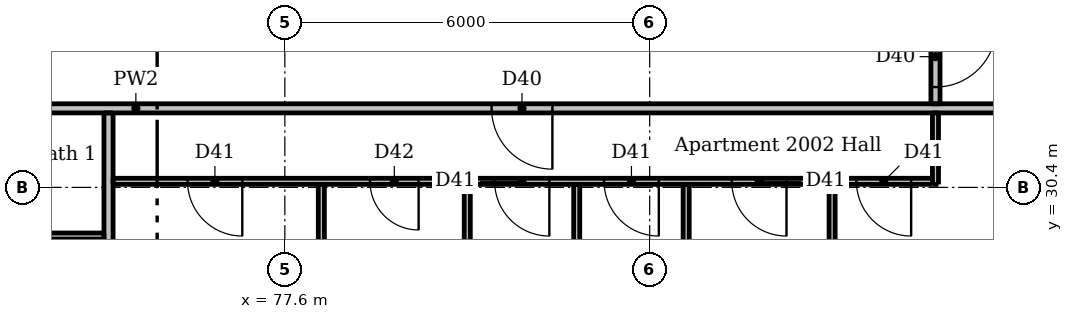
"""IFC4 building model, lengths in metres.
Left out: names, types, materials, properties, quantities, classifications, styles, units other than length and angle.
Written with IfcOpenShell. Run it as: python <this file> out.ifc"""

import sys

from ifc_helpers import new_model, si_unit, direction, frame, frame_2d, origin, place, context, subcontext, project, spatial, rectangle, extrude, element, fill, save


model = new_model("IFC4")
c1 = context("Model", 3, precision=1e-05, world=origin(), true_north=direction((0.0, 1.0)))
c2 = subcontext(c1, "Body", "Model", "MODEL_VIEW")
j1 = project(units=[si_unit("LENGTHUNIT", "METRE"), si_unit("PLANEANGLEUNIT", "RADIAN")], contexts=[c1])
p1 = place(None, origin())
s1 = spatial("IfcSite", under=j1, at=p1, CompositionType="ELEMENT")
p2 = place(p1, origin())
s2 = spatial("IfcBuilding", under=s1, at=p2, CompositionType="ELEMENT")
p3 = place(p2, frame((0.0, 0.0, 78.7)))
s3 = spatial("IfcBuildingStorey", under=s2, at=p3, CompositionType="ELEMENT", Elevation=78.7)
p4 = place(p3, frame((78.2, 28.35, 0.0), z_axis=(0.0, 0.0, 1.0), x_axis=(0.0, 1.0, 0.0)))
e1 = element("IfcWall", 1, at=p4, inside=s3, PredefinedType="PARTITIONING", context=c2, shape_type="SweptSolid", body=[
    extrude(rectangle(XDim=2.1, YDim=0.1, at=frame_2d((1.05, 0.0))), origin(), (0.0, 0.0, 1.0), 3.05),
])
p5 = place(p3, frame((80.6, 21.5, 0.0), z_axis=(0.0, 0.0, 1.0), x_axis=(0.0, 1.0, 0.0)))
e2 = element("IfcWall", 2, at=p5, inside=s3, PredefinedType="PARTITIONING", context=c2, shape_type="SweptSolid", body=[
    extrude(rectangle(XDim=8.95, YDim=0.1, at=frame_2d((4.475, 0.0))), origin(), (0.0, 0.0, 1.0), 3.05),
])
p6 = place(p3, frame((82.4, 28.35, 0.0), z_axis=(0.0, 0.0, 1.0), x_axis=(0.0, 1.0, 0.0)))
e3 = element("IfcWall", 3, at=p6, inside=s3, PredefinedType="PARTITIONING", context=c2, shape_type="SweptSolid", body=[
    extrude(rectangle(XDim=2.1, YDim=0.1, at=frame_2d((1.05, 0.0))), origin(), (0.0, 0.0, 1.0), 3.05),
])
p7 = place(p3, frame((84.2, 28.45, 0.0), z_axis=(0.0, 0.0, 1.0), x_axis=(0.0, 1.0, 0.0)))
e4 = element("IfcWall", 4, at=p7, inside=s3, PredefinedType="PARTITIONING", context=c2, shape_type="SweptSolid", body=[
    extrude(rectangle(XDim=2.0, YDim=0.1, at=frame_2d((1.0, 0.0))), origin(), (0.0, 0.0, 1.0), 3.05),
])
p8 = place(p3, frame((86.6, 24.5, 0.0), z_axis=(0.0, 0.0, 1.0), x_axis=(0.0, 1.0, 0.0)))
e5 = element("IfcWall", 5, at=p8, inside=s3, PredefinedType="PARTITIONING", context=c2, shape_type="SweptSolid", body=[
    extrude(rectangle(XDim=5.95, YDim=0.1, at=frame_2d((2.975, 0.0))), origin(), (0.0, 0.0, 1.0), 3.05),
])
p9 = place(p3, frame((88.3, 30.45, 0.0), z_axis=(0.0, 0.0, 1.0), x_axis=(0.0, 1.0, 0.0)))
e6 = element("IfcWall", 6, at=p9, inside=s3, PredefinedType="PARTITIONING", context=c2, shape_type="SweptSolid", body=[
    extrude(rectangle(XDim=1.175, YDim=0.1, at=frame_2d((0.587, 0.0))), origin(), (0.0, 0.0, 1.0), 3.05),
])
p10 = place(p3, frame((88.25, 30.5, 0.0), z_axis=(0.0, 0.0, 1.0), x_axis=(-1.0, 0.0, 0.0)))
e7 = element("IfcWall", 7, at=p10, inside=s3, PredefinedType="PARTITIONING", context=c2, shape_type="SweptSolid", body=[
    extrude(rectangle(XDim=13.475, YDim=0.1, at=frame_2d((6.738, 0.0))), origin(), (0.0, 0.0, 1.0), 3.05),
])
p11 = place(p10, frame((6.3, 0.0, 0.0)))
e8 = element("IfcOpeningElement", 8, at=p11, cuts=e7, PredefinedType="OPENING", context=c2, shape_type="SweptSolid", body=[
    extrude(rectangle(XDim=0.9, YDim=2.1, at=frame_2d((0.45, 1.05))), frame((0.0, 0.06, 0.0), z_axis=(0.0, -1.0, 0.0), x_axis=(1.0, 0.0, 0.0)), (0.0, 0.0, 1.0), 0.12),
])
p12 = place(p10, frame((2.4, 0.0, 0.0)))
e9 = element("IfcOpeningElement", 9, at=p12, cuts=e7, PredefinedType="OPENING", context=c2, shape_type="SweptSolid", body=[
    extrude(rectangle(XDim=0.9, YDim=2.1, at=frame_2d((0.45, 1.05))), frame((0.0, 0.06, 0.0), z_axis=(0.0, -1.0, 0.0), x_axis=(1.0, 0.0, 0.0)), (0.0, 0.0, 1.0), 0.12),
])
p13 = place(p10, frame((4.5, 0.0, 0.0)))
e10 = element("IfcOpeningElement", 10, at=p13, cuts=e7, PredefinedType="OPENING", context=c2, shape_type="SweptSolid", body=[
    extrude(rectangle(XDim=0.9, YDim=2.1, at=frame_2d((0.45, 1.05))), frame((0.0, 0.06, 0.0), z_axis=(0.0, -1.0, 0.0), x_axis=(1.0, 0.0, 0.0)), (0.0, 0.0, 1.0), 0.12),
])
p14 = place(p10, frame((11.35, 0.0, 0.0)))
e11 = element("IfcOpeningElement", 11, at=p14, cuts=e7, PredefinedType="OPENING", context=c2, shape_type="SweptSolid", body=[
    extrude(rectangle(XDim=0.9, YDim=2.1, at=frame_2d((0.45, 1.05))), frame((0.0, 0.06, 0.0), z_axis=(0.0, -1.0, 0.0), x_axis=(1.0, 0.0, 0.0)), (0.0, 0.0, 1.0), 0.12),
])
p15 = place(p10, frame((0.35, 0.0, 0.0)))
e12 = element("IfcOpeningElement", 12, at=p15, cuts=e7, PredefinedType="OPENING", context=c2, shape_type="SweptSolid", body=[
    extrude(rectangle(XDim=0.9, YDim=2.1, at=frame_2d((0.45, 1.05))), frame((0.0, 0.06, 0.0), z_axis=(0.0, -1.0, 0.0), x_axis=(1.0, 0.0, 0.0)), (0.0, 0.0, 1.0), 0.12),
])
p16 = place(p10, frame((8.45, 0.0, 0.0)))
e13 = element("IfcOpeningElement", 13, at=p16, cuts=e7, PredefinedType="OPENING", context=c2, shape_type="SweptSolid", body=[
    extrude(rectangle(XDim=0.8, YDim=2.1, at=frame_2d((0.4, 1.05))), frame((0.0, 0.06, 0.0), z_axis=(0.0, -1.0, 0.0), x_axis=(1.0, 0.0, 0.0)), (0.0, 0.0, 1.0), 0.12),
])
p17 = place(p3, frame((68.15, 29.6, 0.0), z_axis=(0.0, 0.0, 1.0), x_axis=(1.0, 0.0, 0.0)))
e14 = element("IfcWall", 14, at=p17, inside=s3, PredefinedType="PARTITIONING", context=c2, shape_type="SweptSolid", body=[
    extrude(rectangle(XDim=6.475, YDim=0.1, at=frame_2d((3.238, 0.0))), origin(), (0.0, 0.0, 1.0), 3.05),
])
p18 = place(p17, frame((4.05, 0.0, 0.0)))
e15 = element("IfcOpeningElement", 15, at=p18, cuts=e14, PredefinedType="OPENING", context=c2, shape_type="SweptSolid", body=[
    extrude(rectangle(XDim=0.8, YDim=2.1, at=frame_2d((0.4, 1.05))), frame((0.0, 0.06, 0.0), z_axis=(0.0, -1.0, 0.0), x_axis=(1.0, 0.0, 0.0)), (0.0, 0.0, 1.0), 0.12),
])
p19 = place(p3, frame((74.7, 21.5, 0.0), z_axis=(0.0, 0.0, 1.0), x_axis=(0.0, 1.0, 0.0)))
e16 = element("IfcWall", 16, at=p19, inside=s3, PredefinedType="PARTITIONING", context=c2, shape_type="SweptSolid", body=[
    extrude(rectangle(XDim=10.125, YDim=0.15, at=frame_2d((5.062, 0.0))), origin(), (0.0, 0.0, 1.0), 3.05),
])
p20 = place(p3, frame((88.3, 60.475, 0.0), z_axis=(0.0, 0.0, 1.0), x_axis=(0.0, -1.0, 0.0)))
e17 = element("IfcWall", 17, at=p20, inside=s3, PredefinedType="PARTITIONING", context=c2, shape_type="SweptSolid", body=[
    extrude(rectangle(XDim=28.7, YDim=0.15, at=frame_2d((14.35, 0.0))), origin(), (0.0, 0.0, 1.0), 3.05),
])
p21 = place(p20, frame((27.425, 0.0, 0.0)))
e18 = element("IfcOpeningElement", 18, at=p21, cuts=e17, PredefinedType="OPENING", context=c2, shape_type="SweptSolid", body=[
    extrude(rectangle(XDim=1.0, YDim=2.1, at=frame_2d((0.5, 1.05))), frame((0.0, 0.085, 0.0), z_axis=(0.0, -1.0, 0.0), x_axis=(1.0, 0.0, 0.0)), (0.0, 0.0, 1.0), 0.17),
])
p22 = place(p20, frame((10.575, 0.0, 0.0)))
e19 = element("IfcOpeningElement", 19, at=p22, cuts=e17, PredefinedType="OPENING", context=c2, shape_type="SweptSolid", body=[
    extrude(rectangle(XDim=1.0, YDim=2.1, at=frame_2d((0.5, 1.05))), frame((0.0, 0.085, 0.0), z_axis=(0.0, -1.0, 0.0), x_axis=(1.0, 0.0, 0.0)), (0.0, 0.0, 1.0), 0.17),
])
p23 = place(p3, frame((89.525, 31.7, 0.0), z_axis=(0.0, 0.0, 1.0), x_axis=(-1.0, 0.0, 0.0)))
e20 = element("IfcWall", 20, at=p23, inside=s3, PredefinedType="PARTITIONING", context=c2, shape_type="SweptSolid", body=[
    extrude(rectangle(XDim=28.75, YDim=0.15, at=frame_2d((14.375, 0.0))), origin(), (0.0, 0.0, 1.0), 3.05),
])
p24 = place(p23, frame((24.625, 0.0, 0.0)))
e21 = element("IfcOpeningElement", 21, at=p24, cuts=e20, PredefinedType="OPENING", context=c2, shape_type="SweptSolid", body=[
    extrude(rectangle(XDim=1.0, YDim=2.1, at=frame_2d((0.5, 1.05))), frame((0.0, 0.085, 0.0), z_axis=(0.0, -1.0, 0.0), x_axis=(1.0, 0.0, 0.0)), (0.0, 0.0, 1.0), 0.17),
])
p25 = place(p23, frame((7.525, 0.0, 0.0)))
e22 = element("IfcOpeningElement", 22, at=p25, cuts=e20, PredefinedType="OPENING", context=c2, shape_type="SweptSolid", body=[
    extrude(rectangle(XDim=1.0, YDim=2.1, at=frame_2d((0.5, 1.05))), frame((0.0, 0.085, 0.0), z_axis=(0.0, -1.0, 0.0), x_axis=(1.0, 0.0, 0.0)), (0.0, 0.0, 1.0), 0.17),
])
p26 = place(p25, origin())
e23 = element("IfcDoor", 23, at=p26, inside=s3, OperationType="SINGLE_SWING_LEFT", PredefinedType="DOOR", context=c2, shape_type="SweptSolid", body=[
    extrude(rectangle(XDim=1.0, YDim=2.1, at=frame_2d((0.5, 1.05))), frame((0.0, 0.025, 0.0), z_axis=(0.0, -1.0, 0.0), x_axis=(1.0, 0.0, 0.0)), (0.0, 0.0, 1.0), 0.05),
])
fill(e22, e23)
p27 = place(p11, origin())
e24 = element("IfcDoor", 24, at=p27, inside=s3, OperationType="SINGLE_SWING_LEFT", PredefinedType="DOOR", context=c2, shape_type="SweptSolid", body=[
    extrude(rectangle(XDim=0.9, YDim=2.1, at=frame_2d((0.45, 1.05))), frame((0.0, 0.025, 0.0), z_axis=(0.0, -1.0, 0.0), x_axis=(1.0, 0.0, 0.0)), (0.0, 0.0, 1.0), 0.05),
])
fill(e8, e24)
p28 = place(p12, origin())
e25 = element("IfcDoor", 25, at=p28, inside=s3, OperationType="SINGLE_SWING_LEFT", PredefinedType="DOOR", context=c2, shape_type="SweptSolid", body=[
    extrude(rectangle(XDim=0.9, YDim=2.1, at=frame_2d((0.45, 1.05))), frame((0.0, 0.025, 0.0), z_axis=(0.0, -1.0, 0.0), x_axis=(1.0, 0.0, 0.0)), (0.0, 0.0, 1.0), 0.05),
])
fill(e9, e25)
p29 = place(p13, origin())
e26 = element("IfcDoor", 26, at=p29, inside=s3, OperationType="SINGLE_SWING_LEFT", PredefinedType="DOOR", context=c2, shape_type="SweptSolid", body=[
    extrude(rectangle(XDim=0.9, YDim=2.1, at=frame_2d((0.45, 1.05))), frame((0.0, 0.025, 0.0), z_axis=(0.0, -1.0, 0.0), x_axis=(1.0, 0.0, 0.0)), (0.0, 0.0, 1.0), 0.05),
])
fill(e10, e26)
p30 = place(p14, origin())
e27 = element("IfcDoor", 27, at=p30, inside=s3, OperationType="SINGLE_SWING_LEFT", PredefinedType="DOOR", context=c2, shape_type="SweptSolid", body=[
    extrude(rectangle(XDim=0.9, YDim=2.1, at=frame_2d((0.45, 1.05))), frame((0.0, 0.025, 0.0), z_axis=(0.0, -1.0, 0.0), x_axis=(1.0, 0.0, 0.0)), (0.0, 0.0, 1.0), 0.05),
])
fill(e11, e27)
p31 = place(p15, origin())
e28 = element("IfcDoor", 28, at=p31, inside=s3, OperationType="SINGLE_SWING_LEFT", PredefinedType="DOOR", context=c2, shape_type="SweptSolid", body=[
    extrude(rectangle(XDim=0.9, YDim=2.1, at=frame_2d((0.45, 1.05))), frame((0.0, 0.025, 0.0), z_axis=(0.0, -1.0, 0.0), x_axis=(1.0, 0.0, 0.0)), (0.0, 0.0, 1.0), 0.05),
])
fill(e12, e28)
p32 = place(p16, origin())
e29 = element("IfcDoor", 29, at=p32, inside=s3, OperationType="SINGLE_SWING_LEFT", PredefinedType="DOOR", context=c2, shape_type="SweptSolid", body=[
    extrude(rectangle(XDim=0.8, YDim=2.1, at=frame_2d((0.4, 1.05))), frame((0.0, 0.025, 0.0), z_axis=(0.0, -1.0, 0.0), x_axis=(1.0, 0.0, 0.0)), (0.0, 0.0, 1.0), 0.05),
])
fill(e13, e29)
p33 = place(p21, origin())
e30 = element("IfcDoor", 30, at=p33, inside=s3, OperationType="SINGLE_SWING_LEFT", PredefinedType="DOOR", context=c2, shape_type="SweptSolid", body=[
    extrude(rectangle(XDim=1.0, YDim=2.1, at=frame_2d((0.5, 1.05))), frame((0.0, 0.025, 0.0), z_axis=(0.0, -1.0, 0.0), x_axis=(1.0, 0.0, 0.0)), (0.0, 0.0, 1.0), 0.05),
])
fill(e18, e30)
save(model, sys.argv[1])
